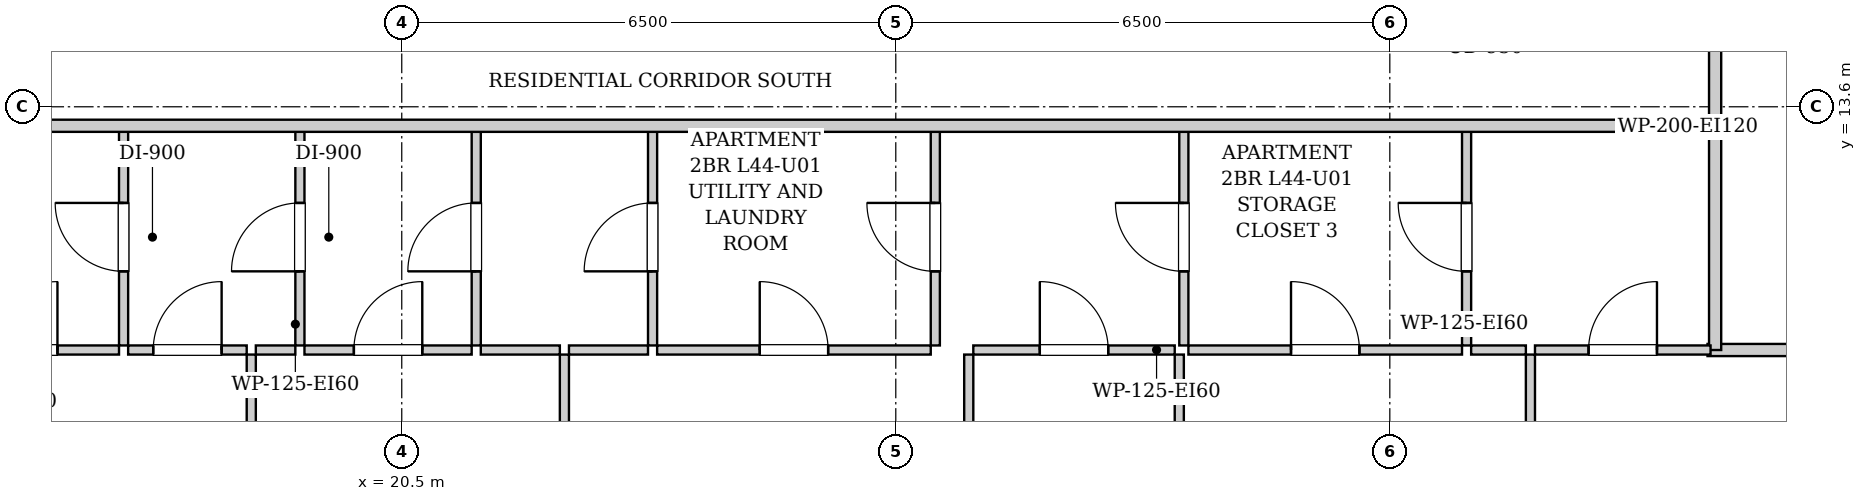
"""IFC4 building model, lengths in metres.
Left out: names, types, materials, properties, quantities, classifications, styles, units other than length and angle.
Written with IfcOpenShell. Run it as: python <this file> out.ifc"""

import sys

from ifc_helpers import new_model, si_unit, direction, frame, frame_2d, origin, place, context, subcontext, project, spatial, rectangle, extrude, element, fill, save


model = new_model("IFC4")
c1 = context("Model", 3, precision=1e-05, world=origin(), true_north=direction((0.0, 1.0)))
c2 = subcontext(c1, "Body", "Model", "MODEL_VIEW")
j1 = project(units=[si_unit("LENGTHUNIT", "METRE"), si_unit("PLANEANGLEUNIT", "RADIAN")], contexts=[c1])
p1 = place(None, origin())
s1 = spatial("IfcSite", under=j1, at=p1, CompositionType="ELEMENT")
p2 = place(p1, origin())
s2 = spatial("IfcBuilding", under=s1, at=p2, CompositionType="ELEMENT")
p3 = place(p2, frame((0.0, 0.0, 153.65)))
s3 = spatial("IfcBuildingStorey", under=s2, at=p3, CompositionType="ELEMENT", Elevation=153.65)
p4 = place(p3, frame((37.78, 13.35, 0.0), z_axis=(0.0, 0.0, 1.0), x_axis=(0.0, 1.0, 0.0)))
e1 = element("IfcWall", 1, at=p4, inside=s3, PredefinedType="PARTITIONING", context=c2, shape_type="SweptSolid", body=[
    extrude(rectangle(XDim=1.74, YDim=0.16, at=frame_2d((0.87, 0.0))), origin(), (0.0, 0.0, 1.0), 2.99),
])
p5 = place(p3, frame((37.68, 10.4, 0.0), z_axis=(0.0, 0.0, 1.0), x_axis=(1.0, 0.0, 0.0)))
e2 = element("IfcWall", 2, at=p5, inside=s3, PredefinedType="PARTITIONING", context=c2, shape_type="SweptSolid", body=[
    extrude(rectangle(XDim=2.34, YDim=0.16, at=frame_2d((1.17, 0.0))), origin(), (0.0, 0.0, 1.0), 2.99),
])
p6 = place(p3, frame((37.78, 10.4, 0.0), z_axis=(0.0, 0.0, 1.0), x_axis=(0.0, 1.0, 0.0)))
e3 = element("IfcWall", 3, at=p6, inside=s3, PredefinedType="PARTITIONING", context=c2, shape_type="SweptSolid", body=[
    extrude(rectangle(XDim=2.91, YDim=0.16, at=frame_2d((1.455, 0.0))), origin(), (0.0, 0.0, 1.0), 2.99),
])
p7 = place(p3, frame((16.84, 10.46, 0.0), z_axis=(0.0, 0.0, 1.0), x_axis=(0.0, 1.0, 0.0)))
e4 = element("IfcWall", 4, at=p7, inside=s3, PredefinedType="PARTITIONING", context=c2, shape_type="SweptSolid", body=[
    extrude(rectangle(XDim=2.85, YDim=0.12, at=frame_2d((1.425, 0.0))), origin(), (0.0, 0.0, 1.0), 2.99),
])
p8 = place(p7, frame((0.975, 0.0, 0.0)))
e5 = element("IfcOpeningElement", 5, at=p8, cuts=e4, PredefinedType="OPENING", context=c2, shape_type="SweptSolid", body=[
    extrude(rectangle(XDim=0.9, YDim=2.05, at=frame_2d((0.45, 1.025))), frame((0.0, 0.07, 0.0), z_axis=(0.0, -1.0, 0.0), x_axis=(1.0, 0.0, 0.0)), (0.0, 0.0, 1.0), 0.14),
])
p9 = place(p3, frame((14.26, 10.4, 0.0), z_axis=(0.0, 0.0, 1.0), x_axis=(1.0, 0.0, 0.0)))
e6 = element("IfcWall", 6, at=p9, inside=s3, PredefinedType="PARTITIONING", context=c2, shape_type="SweptSolid", body=[
    extrude(rectangle(XDim=2.52, YDim=0.12, at=frame_2d((1.26, 0.0))), origin(), (0.0, 0.0, 1.0), 2.99),
])
p10 = place(p9, frame((0.81, 0.0, 0.0)))
e7 = element("IfcOpeningElement", 7, at=p10, cuts=e6, PredefinedType="OPENING", context=c2, shape_type="SweptSolid", body=[
    extrude(rectangle(XDim=0.9, YDim=2.05, at=frame_2d((0.45, 1.025))), frame((0.0, 0.07, 0.0), z_axis=(0.0, -1.0, 0.0), x_axis=(1.0, 0.0, 0.0)), (0.0, 0.0, 1.0), 0.14),
])
p11 = place(p3, frame((19.16, 10.46, 0.0), z_axis=(0.0, 0.0, 1.0), x_axis=(0.0, 1.0, 0.0)))
e8 = element("IfcWall", 8, at=p11, inside=s3, PredefinedType="PARTITIONING", context=c2, shape_type="SweptSolid", body=[
    extrude(rectangle(XDim=2.85, YDim=0.12, at=frame_2d((1.425, 0.0))), origin(), (0.0, 0.0, 1.0), 2.99),
])
p12 = place(p11, frame((0.975, 0.0, 0.0)))
e9 = element("IfcOpeningElement", 9, at=p12, cuts=e8, PredefinedType="OPENING", context=c2, shape_type="SweptSolid", body=[
    extrude(rectangle(XDim=0.9, YDim=2.05, at=frame_2d((0.45, 1.025))), frame((0.0, 0.07, 0.0), z_axis=(0.0, -1.0, 0.0), x_axis=(1.0, 0.0, 0.0)), (0.0, 0.0, 1.0), 0.14),
])
p13 = place(p3, frame((16.9, 10.4, 0.0), z_axis=(0.0, 0.0, 1.0), x_axis=(1.0, 0.0, 0.0)))
e10 = element("IfcWall", 10, at=p13, inside=s3, PredefinedType="PARTITIONING", context=c2, shape_type="SweptSolid", body=[
    extrude(rectangle(XDim=1.56, YDim=0.12, at=frame_2d((0.78, 0.0))), origin(), (0.0, 0.0, 1.0), 2.99),
])
p14 = place(p13, frame((0.33, 0.0, 0.0)))
e11 = element("IfcOpeningElement", 11, at=p14, cuts=e10, PredefinedType="OPENING", context=c2, shape_type="SweptSolid", body=[
    extrude(rectangle(XDim=0.9, YDim=2.05, at=frame_2d((0.45, 1.025))), frame((0.0, 0.07, 0.0), z_axis=(0.0, -1.0, 0.0), x_axis=(1.0, 0.0, 0.0)), (0.0, 0.0, 1.0), 0.14),
])
p15 = place(p3, frame((18.58, 10.4, 0.0), z_axis=(0.0, 0.0, 1.0), x_axis=(1.0, 0.0, 0.0)))
e12 = element("IfcWall", 12, at=p15, inside=s3, PredefinedType="PARTITIONING", context=c2, shape_type="SweptSolid", body=[
    extrude(rectangle(XDim=0.52, YDim=0.12, at=frame_2d((0.26, 0.0))), origin(), (0.0, 0.0, 1.0), 2.99),
])
p16 = place(p3, frame((21.48, 10.46, 0.0), z_axis=(0.0, 0.0, 1.0), x_axis=(0.0, 1.0, 0.0)))
e13 = element("IfcWall", 13, at=p16, inside=s3, PredefinedType="PARTITIONING", context=c2, shape_type="SweptSolid", body=[
    extrude(rectangle(XDim=2.85, YDim=0.12, at=frame_2d((1.425, 0.0))), origin(), (0.0, 0.0, 1.0), 2.99),
])
p17 = place(p16, frame((0.975, 0.0, 0.0)))
e14 = element("IfcOpeningElement", 14, at=p17, cuts=e13, PredefinedType="OPENING", context=c2, shape_type="SweptSolid", body=[
    extrude(rectangle(XDim=0.9, YDim=2.05, at=frame_2d((0.45, 1.025))), frame((0.0, 0.07, 0.0), z_axis=(0.0, -1.0, 0.0), x_axis=(1.0, 0.0, 0.0)), (0.0, 0.0, 1.0), 0.14),
])
p18 = place(p3, frame((19.22, 10.4, 0.0), z_axis=(0.0, 0.0, 1.0), x_axis=(1.0, 0.0, 0.0)))
e15 = element("IfcWall", 15, at=p18, inside=s3, PredefinedType="PARTITIONING", context=c2, shape_type="SweptSolid", body=[
    extrude(rectangle(XDim=2.2, YDim=0.12, at=frame_2d((1.1, 0.0))), origin(), (0.0, 0.0, 1.0), 2.99),
])
p19 = place(p18, frame((0.65, 0.0, 0.0)))
e16 = element("IfcOpeningElement", 16, at=p19, cuts=e15, PredefinedType="OPENING", context=c2, shape_type="SweptSolid", body=[
    extrude(rectangle(XDim=0.9, YDim=2.05, at=frame_2d((0.45, 1.025))), frame((0.0, 0.07, 0.0), z_axis=(0.0, -1.0, 0.0), x_axis=(1.0, 0.0, 0.0)), (0.0, 0.0, 1.0), 0.14),
])
p20 = place(p3, frame((23.8, 10.46, 0.0), z_axis=(0.0, 0.0, 1.0), x_axis=(0.0, 1.0, 0.0)))
e17 = element("IfcWall", 17, at=p20, inside=s3, PredefinedType="PARTITIONING", context=c2, shape_type="SweptSolid", body=[
    extrude(rectangle(XDim=2.85, YDim=0.12, at=frame_2d((1.425, 0.0))), origin(), (0.0, 0.0, 1.0), 2.99),
])
p21 = place(p20, frame((0.975, 0.0, 0.0)))
e18 = element("IfcOpeningElement", 18, at=p21, cuts=e17, PredefinedType="OPENING", context=c2, shape_type="SweptSolid", body=[
    extrude(rectangle(XDim=0.9, YDim=2.05, at=frame_2d((0.45, 1.025))), frame((0.0, 0.07, 0.0), z_axis=(0.0, -1.0, 0.0), x_axis=(1.0, 0.0, 0.0)), (0.0, 0.0, 1.0), 0.14),
])
for number, where, z_axis, x_axis in (
    (19, (21.54, 10.4, 0.0), (0.0, 0.0, 1.0), (1.0, 0.0, 0.0)),
    (20, (22.7, 10.4, 0.0), (0.0, 0.0, 1.0), (1.0, 0.0, 0.0)),
):
    element("IfcWall", number, at=place(p3, frame(where, z_axis=z_axis, x_axis=x_axis)), inside=s3, PredefinedType="PARTITIONING", context=c2, shape_type="SweptSolid", body=[
        extrude(rectangle(XDim=1.04, YDim=0.12, at=frame_2d((0.52, 0.0))), origin(), (0.0, 0.0, 1.0), 2.99),
    ])
p22 = place(p3, frame((27.52, 10.46, 0.0), z_axis=(0.0, 0.0, 1.0), x_axis=(0.0, 1.0, 0.0)))
e21 = element("IfcWall", 21, at=p22, inside=s3, PredefinedType="PARTITIONING", context=c2, shape_type="SweptSolid", body=[
    extrude(rectangle(XDim=2.85, YDim=0.12, at=frame_2d((1.425, 0.0))), origin(), (0.0, 0.0, 1.0), 2.99),
])
p23 = place(p22, frame((0.975, 0.0, 0.0)))
e22 = element("IfcOpeningElement", 22, at=p23, cuts=e21, PredefinedType="OPENING", context=c2, shape_type="SweptSolid", body=[
    extrude(rectangle(XDim=0.9, YDim=2.05, at=frame_2d((0.45, 1.025))), frame((0.0, 0.07, 0.0), z_axis=(0.0, -1.0, 0.0), x_axis=(1.0, 0.0, 0.0)), (0.0, 0.0, 1.0), 0.14),
])
p24 = place(p3, frame((23.86, 10.4, 0.0), z_axis=(0.0, 0.0, 1.0), x_axis=(1.0, 0.0, 0.0)))
e23 = element("IfcWall", 23, at=p24, inside=s3, PredefinedType="PARTITIONING", context=c2, shape_type="SweptSolid", body=[
    extrude(rectangle(XDim=3.6, YDim=0.12, at=frame_2d((1.8, 0.0))), origin(), (0.0, 0.0, 1.0), 2.99),
])
p25 = place(p24, frame((1.35, 0.0, 0.0)))
e24 = element("IfcOpeningElement", 24, at=p25, cuts=e23, PredefinedType="OPENING", context=c2, shape_type="SweptSolid", body=[
    extrude(rectangle(XDim=0.9, YDim=2.05, at=frame_2d((0.45, 1.025))), frame((0.0, 0.07, 0.0), z_axis=(0.0, -1.0, 0.0), x_axis=(1.0, 0.0, 0.0)), (0.0, 0.0, 1.0), 0.14),
])
p26 = place(p3, frame((30.79, 10.46, 0.0), z_axis=(0.0, 0.0, 1.0), x_axis=(0.0, 1.0, 0.0)))
e25 = element("IfcWall", 25, at=p26, inside=s3, PredefinedType="PARTITIONING", context=c2, shape_type="SweptSolid", body=[
    extrude(rectangle(XDim=2.85, YDim=0.12, at=frame_2d((1.425, 0.0))), origin(), (0.0, 0.0, 1.0), 2.99),
])
p27 = place(p26, frame((0.975, 0.0, 0.0)))
e26 = element("IfcOpeningElement", 26, at=p27, cuts=e25, PredefinedType="OPENING", context=c2, shape_type="SweptSolid", body=[
    extrude(rectangle(XDim=0.9, YDim=2.05, at=frame_2d((0.45, 1.025))), frame((0.0, 0.07, 0.0), z_axis=(0.0, -1.0, 0.0), x_axis=(1.0, 0.0, 0.0)), (0.0, 0.0, 1.0), 0.14),
])
p28 = place(p3, frame((28.02, 10.4, 0.0), z_axis=(0.0, 0.0, 1.0), x_axis=(1.0, 0.0, 0.0)))
e27 = element("IfcWall", 27, at=p28, inside=s3, PredefinedType="PARTITIONING", context=c2, shape_type="SweptSolid", body=[
    extrude(rectangle(XDim=2.65, YDim=0.12, at=frame_2d((1.325, 0.0))), origin(), (0.0, 0.0, 1.0), 2.99),
])
p29 = place(p28, frame((0.875, 0.0, 0.0)))
e28 = element("IfcOpeningElement", 28, at=p29, cuts=e27, PredefinedType="OPENING", context=c2, shape_type="SweptSolid", body=[
    extrude(rectangle(XDim=0.9, YDim=2.05, at=frame_2d((0.45, 1.025))), frame((0.0, 0.07, 0.0), z_axis=(0.0, -1.0, 0.0), x_axis=(1.0, 0.0, 0.0)), (0.0, 0.0, 1.0), 0.14),
])
p30 = place(p3, frame((34.51, 10.46, 0.0), z_axis=(0.0, 0.0, 1.0), x_axis=(0.0, 1.0, 0.0)))
e29 = element("IfcWall", 29, at=p30, inside=s3, PredefinedType="PARTITIONING", context=c2, shape_type="SweptSolid", body=[
    extrude(rectangle(XDim=2.85, YDim=0.12, at=frame_2d((1.425, 0.0))), origin(), (0.0, 0.0, 1.0), 2.99),
])
p31 = place(p30, frame((0.975, 0.0, 0.0)))
e30 = element("IfcOpeningElement", 30, at=p31, cuts=e29, PredefinedType="OPENING", context=c2, shape_type="SweptSolid", body=[
    extrude(rectangle(XDim=0.9, YDim=2.05, at=frame_2d((0.45, 1.025))), frame((0.0, 0.07, 0.0), z_axis=(0.0, -1.0, 0.0), x_axis=(1.0, 0.0, 0.0)), (0.0, 0.0, 1.0), 0.14),
])
p32 = place(p3, frame((30.85, 10.4, 0.0), z_axis=(0.0, 0.0, 1.0), x_axis=(1.0, 0.0, 0.0)))
e31 = element("IfcWall", 31, at=p32, inside=s3, PredefinedType="PARTITIONING", context=c2, shape_type="SweptSolid", body=[
    extrude(rectangle(XDim=3.6, YDim=0.12, at=frame_2d((1.8, 0.0))), origin(), (0.0, 0.0, 1.0), 2.99),
])
p33 = place(p32, frame((1.35, 0.0, 0.0)))
e32 = element("IfcOpeningElement", 32, at=p33, cuts=e31, PredefinedType="OPENING", context=c2, shape_type="SweptSolid", body=[
    extrude(rectangle(XDim=0.9, YDim=2.05, at=frame_2d((0.45, 1.025))), frame((0.0, 0.07, 0.0), z_axis=(0.0, -1.0, 0.0), x_axis=(1.0, 0.0, 0.0)), (0.0, 0.0, 1.0), 0.14),
])
p34 = place(p3, frame((34.57, 10.4, 0.0), z_axis=(0.0, 0.0, 1.0), x_axis=(1.0, 0.0, 0.0)))
e33 = element("IfcWall", 33, at=p34, inside=s3, PredefinedType="PARTITIONING", context=c2, shape_type="SweptSolid", body=[
    extrude(rectangle(XDim=0.72, YDim=0.12, at=frame_2d((0.36, 0.0))), origin(), (0.0, 0.0, 1.0), 2.99),
])
p35 = place(p3, frame((35.41, 10.4, 0.0), z_axis=(0.0, 0.0, 1.0), x_axis=(1.0, 0.0, 0.0)))
e34 = element("IfcWall", 34, at=p35, inside=s3, PredefinedType="PARTITIONING", context=c2, shape_type="SweptSolid", body=[
    extrude(rectangle(XDim=2.31, YDim=0.12, at=frame_2d((1.155, 0.0))), origin(), (0.0, 0.0, 1.0), 2.99),
])
p36 = place(p35, frame((0.705, 0.0, 0.0)))
e35 = element("IfcOpeningElement", 35, at=p36, cuts=e34, PredefinedType="OPENING", context=c2, shape_type="SweptSolid", body=[
    extrude(rectangle(XDim=0.9, YDim=2.05, at=frame_2d((0.45, 1.025))), frame((0.0, 0.07, 0.0), z_axis=(0.0, -1.0, 0.0), x_axis=(1.0, 0.0, 0.0)), (0.0, 0.0, 1.0), 0.14),
])
p37 = place(p3, frame((18.52, 4.08, 0.0), z_axis=(0.0, 0.0, 1.0), x_axis=(0.0, 1.0, 0.0)))
e36 = element("IfcWall", 36, at=p37, inside=s3, PredefinedType="PARTITIONING", context=c2, shape_type="SweptSolid", body=[
    extrude(rectangle(XDim=6.26, YDim=0.12, at=frame_2d((3.13, 0.0))), origin(), (0.0, 0.0, 1.0), 2.99),
])
p38 = place(p37, frame((2.665, 0.0, 0.0)))
e37 = element("IfcOpeningElement", 37, at=p38, cuts=e36, PredefinedType="OPENING", context=c2, shape_type="SweptSolid", body=[
    extrude(rectangle(XDim=0.9, YDim=2.05, at=frame_2d((0.45, 1.025))), frame((0.0, 0.07, 0.0), z_axis=(0.0, -1.0, 0.0), x_axis=(1.0, 0.0, 0.0)), (0.0, 0.0, 1.0), 0.14),
])
p39 = place(p3, frame((22.64, 4.08, 0.0), z_axis=(0.0, 0.0, 1.0), x_axis=(0.0, 1.0, 0.0)))
e38 = element("IfcWall", 38, at=p39, inside=s3, PredefinedType="PARTITIONING", context=c2, shape_type="SweptSolid", body=[
    extrude(rectangle(XDim=6.26, YDim=0.12, at=frame_2d((3.13, 0.0))), origin(), (0.0, 0.0, 1.0), 2.99),
])
p40 = place(p39, frame((2.665, 0.0, 0.0)))
e39 = element("IfcOpeningElement", 39, at=p40, cuts=e38, PredefinedType="OPENING", context=c2, shape_type="SweptSolid", body=[
    extrude(rectangle(XDim=0.9, YDim=2.05, at=frame_2d((0.45, 1.025))), frame((0.0, 0.07, 0.0), z_axis=(0.0, -1.0, 0.0), x_axis=(1.0, 0.0, 0.0)), (0.0, 0.0, 1.0), 0.14),
])
p41 = place(p3, frame((27.96, 4.08, 0.0), z_axis=(0.0, 0.0, 1.0), x_axis=(0.0, 1.0, 0.0)))
e40 = element("IfcWall", 40, at=p41, inside=s3, PredefinedType="PARTITIONING", context=c2, shape_type="SweptSolid", body=[
    extrude(rectangle(XDim=6.26, YDim=0.12, at=frame_2d((3.13, 0.0))), origin(), (0.0, 0.0, 1.0), 2.99),
])
p42 = place(p41, frame((2.665, 0.0, 0.0)))
e41 = element("IfcOpeningElement", 41, at=p42, cuts=e40, PredefinedType="OPENING", context=c2, shape_type="SweptSolid", body=[
    extrude(rectangle(XDim=0.9, YDim=2.05, at=frame_2d((0.45, 1.025))), frame((0.0, 0.07, 0.0), z_axis=(0.0, -1.0, 0.0), x_axis=(1.0, 0.0, 0.0)), (0.0, 0.0, 1.0), 0.14),
])
p43 = place(p3, frame((30.73, 4.08, 0.0), z_axis=(0.0, 0.0, 1.0), x_axis=(0.0, 1.0, 0.0)))
e42 = element("IfcWall", 42, at=p43, inside=s3, PredefinedType="PARTITIONING", context=c2, shape_type="SweptSolid", body=[
    extrude(rectangle(XDim=6.26, YDim=0.12, at=frame_2d((3.13, 0.0))), origin(), (0.0, 0.0, 1.0), 2.99),
])
p44 = place(p43, frame((2.665, 0.0, 0.0)))
e43 = element("IfcOpeningElement", 43, at=p44, cuts=e42, PredefinedType="OPENING", context=c2, shape_type="SweptSolid", body=[
    extrude(rectangle(XDim=0.9, YDim=2.05, at=frame_2d((0.45, 1.025))), frame((0.0, 0.07, 0.0), z_axis=(0.0, -1.0, 0.0), x_axis=(1.0, 0.0, 0.0)), (0.0, 0.0, 1.0), 0.14),
])
p45 = place(p3, frame((35.35, 4.08, 0.0), z_axis=(0.0, 0.0, 1.0), x_axis=(0.0, 1.0, 0.0)))
e44 = element("IfcWall", 44, at=p45, inside=s3, PredefinedType="PARTITIONING", context=c2, shape_type="SweptSolid", body=[
    extrude(rectangle(XDim=6.26, YDim=0.12, at=frame_2d((3.13, 0.0))), origin(), (0.0, 0.0, 1.0), 2.99),
])
p46 = place(p45, frame((2.665, 0.0, 0.0)))
e45 = element("IfcOpeningElement", 45, at=p46, cuts=e44, PredefinedType="OPENING", context=c2, shape_type="SweptSolid", body=[
    extrude(rectangle(XDim=0.9, YDim=2.05, at=frame_2d((0.45, 1.025))), frame((0.0, 0.07, 0.0), z_axis=(0.0, -1.0, 0.0), x_axis=(1.0, 0.0, 0.0)), (0.0, 0.0, 1.0), 0.14),
])
p47 = place(p3, frame((10.05, 13.35, 0.0), z_axis=(0.0, 0.0, 1.0), x_axis=(1.0, 0.0, 0.0)))
e46 = element("IfcWall", 46, at=p47, inside=s3, PredefinedType="PARTITIONING", context=c2, shape_type="SweptSolid", body=[
    extrude(rectangle(XDim=27.7, YDim=0.16, at=frame_2d((13.85, 0.0))), origin(), (0.0, 0.0, 1.0), 2.99),
])
p48 = place(p47, frame((4.165, 0.0, 0.0)))
e47 = element("IfcOpeningElement", 47, at=p48, cuts=e46, PredefinedType="OPENING", context=c2, shape_type="SweptSolid", body=[
    extrude(rectangle(XDim=0.95, YDim=2.1, at=frame_2d((0.475, 1.05))), frame((0.0, 0.09, 0.0), z_axis=(0.0, -1.0, 0.0), x_axis=(1.0, 0.0, 0.0)), (0.0, 0.0, 1.0), 0.18),
])
p49 = place(p8, origin())
e48 = element("IfcDoor", 48, at=p49, inside=s3, OperationType="SINGLE_SWING_RIGHT", PredefinedType="DOOR", context=c2, shape_type="SweptSolid", body=[
    extrude(rectangle(XDim=0.9, YDim=2.05, at=frame_2d((0.45, 1.025))), frame((0.0, 0.025, 0.0), z_axis=(0.0, -1.0, 0.0), x_axis=(1.0, 0.0, 0.0)), (0.0, 0.0, 1.0), 0.05),
])
fill(e5, e48)
p50 = place(p10, origin())
e49 = element("IfcDoor", 49, at=p50, inside=s3, OperationType="SINGLE_SWING_RIGHT", PredefinedType="DOOR", context=c2, shape_type="SweptSolid", body=[
    extrude(rectangle(XDim=0.9, YDim=2.05, at=frame_2d((0.45, 1.025))), frame((0.0, 0.025, 0.0), z_axis=(0.0, -1.0, 0.0), x_axis=(1.0, 0.0, 0.0)), (0.0, 0.0, 1.0), 0.05),
])
fill(e7, e49)
p51 = place(p12, origin())
e50 = element("IfcDoor", 50, at=p51, inside=s3, OperationType="SINGLE_SWING_LEFT", PredefinedType="DOOR", context=c2, shape_type="SweptSolid", body=[
    extrude(rectangle(XDim=0.9, YDim=2.05, at=frame_2d((0.45, 1.025))), frame((0.0, 0.025, 0.0), z_axis=(0.0, -1.0, 0.0), x_axis=(1.0, 0.0, 0.0)), (0.0, 0.0, 1.0), 0.05),
])
fill(e9, e50)
p52 = place(p14, origin())
e51 = element("IfcDoor", 51, at=p52, inside=s3, OperationType="SINGLE_SWING_RIGHT", PredefinedType="DOOR", context=c2, shape_type="SweptSolid", body=[
    extrude(rectangle(XDim=0.9, YDim=2.05, at=frame_2d((0.45, 1.025))), frame((0.0, 0.025, 0.0), z_axis=(0.0, -1.0, 0.0), x_axis=(1.0, 0.0, 0.0)), (0.0, 0.0, 1.0), 0.05),
])
fill(e11, e51)
p53 = place(p17, origin())
e52 = element("IfcDoor", 52, at=p53, inside=s3, OperationType="SINGLE_SWING_LEFT", PredefinedType="DOOR", context=c2, shape_type="SweptSolid", body=[
    extrude(rectangle(XDim=0.9, YDim=2.05, at=frame_2d((0.45, 1.025))), frame((0.0, 0.025, 0.0), z_axis=(0.0, -1.0, 0.0), x_axis=(1.0, 0.0, 0.0)), (0.0, 0.0, 1.0), 0.05),
])
fill(e14, e52)
p54 = place(p19, origin())
e53 = element("IfcDoor", 53, at=p54, inside=s3, OperationType="SINGLE_SWING_RIGHT", PredefinedType="DOOR", context=c2, shape_type="SweptSolid", body=[
    extrude(rectangle(XDim=0.9, YDim=2.05, at=frame_2d((0.45, 1.025))), frame((0.0, 0.025, 0.0), z_axis=(0.0, -1.0, 0.0), x_axis=(1.0, 0.0, 0.0)), (0.0, 0.0, 1.0), 0.05),
])
fill(e16, e53)
p55 = place(p21, origin())
e54 = element("IfcDoor", 54, at=p55, inside=s3, OperationType="SINGLE_SWING_LEFT", PredefinedType="DOOR", context=c2, shape_type="SweptSolid", body=[
    extrude(rectangle(XDim=0.9, YDim=2.05, at=frame_2d((0.45, 1.025))), frame((0.0, 0.025, 0.0), z_axis=(0.0, -1.0, 0.0), x_axis=(1.0, 0.0, 0.0)), (0.0, 0.0, 1.0), 0.05),
])
fill(e18, e54)
p56 = place(p23, origin())
e55 = element("IfcDoor", 55, at=p56, inside=s3, OperationType="SINGLE_SWING_RIGHT", PredefinedType="DOOR", context=c2, shape_type="SweptSolid", body=[
    extrude(rectangle(XDim=0.9, YDim=2.05, at=frame_2d((0.45, 1.025))), frame((0.0, 0.025, 0.0), z_axis=(0.0, -1.0, 0.0), x_axis=(1.0, 0.0, 0.0)), (0.0, 0.0, 1.0), 0.05),
])
fill(e22, e55)
p57 = place(p25, origin())
e56 = element("IfcDoor", 56, at=p57, inside=s3, OperationType="SINGLE_SWING_LEFT", PredefinedType="DOOR", context=c2, shape_type="SweptSolid", body=[
    extrude(rectangle(XDim=0.9, YDim=2.05, at=frame_2d((0.45, 1.025))), frame((0.0, 0.025, 0.0), z_axis=(0.0, -1.0, 0.0), x_axis=(1.0, 0.0, 0.0)), (0.0, 0.0, 1.0), 0.05),
])
fill(e24, e56)
p58 = place(p27, origin())
e57 = element("IfcDoor", 57, at=p58, inside=s3, OperationType="SINGLE_SWING_RIGHT", PredefinedType="DOOR", context=c2, shape_type="SweptSolid", body=[
    extrude(rectangle(XDim=0.9, YDim=2.05, at=frame_2d((0.45, 1.025))), frame((0.0, 0.025, 0.0), z_axis=(0.0, -1.0, 0.0), x_axis=(1.0, 0.0, 0.0)), (0.0, 0.0, 1.0), 0.05),
])
fill(e26, e57)
p59 = place(p29, origin())
e58 = element("IfcDoor", 58, at=p59, inside=s3, OperationType="SINGLE_SWING_LEFT", PredefinedType="DOOR", context=c2, shape_type="SweptSolid", body=[
    extrude(rectangle(XDim=0.9, YDim=2.05, at=frame_2d((0.45, 1.025))), frame((0.0, 0.025, 0.0), z_axis=(0.0, -1.0, 0.0), x_axis=(1.0, 0.0, 0.0)), (0.0, 0.0, 1.0), 0.05),
])
fill(e28, e58)
p60 = place(p31, origin())
e59 = element("IfcDoor", 59, at=p60, inside=s3, OperationType="SINGLE_SWING_RIGHT", PredefinedType="DOOR", context=c2, shape_type="SweptSolid", body=[
    extrude(rectangle(XDim=0.9, YDim=2.05, at=frame_2d((0.45, 1.025))), frame((0.0, 0.025, 0.0), z_axis=(0.0, -1.0, 0.0), x_axis=(1.0, 0.0, 0.0)), (0.0, 0.0, 1.0), 0.05),
])
fill(e30, e59)
p61 = place(p33, origin())
e60 = element("IfcDoor", 60, at=p61, inside=s3, OperationType="SINGLE_SWING_LEFT", PredefinedType="DOOR", context=c2, shape_type="SweptSolid", body=[
    extrude(rectangle(XDim=0.9, YDim=2.05, at=frame_2d((0.45, 1.025))), frame((0.0, 0.025, 0.0), z_axis=(0.0, -1.0, 0.0), x_axis=(1.0, 0.0, 0.0)), (0.0, 0.0, 1.0), 0.05),
])
fill(e32, e60)
p62 = place(p36, origin())
e61 = element("IfcDoor", 61, at=p62, inside=s3, OperationType="SINGLE_SWING_RIGHT", PredefinedType="DOOR", context=c2, shape_type="SweptSolid", body=[
    extrude(rectangle(XDim=0.9, YDim=2.05, at=frame_2d((0.45, 1.025))), frame((0.0, 0.025, 0.0), z_axis=(0.0, -1.0, 0.0), x_axis=(1.0, 0.0, 0.0)), (0.0, 0.0, 1.0), 0.05),
])
fill(e35, e61)
save(model, sys.argv[1])
